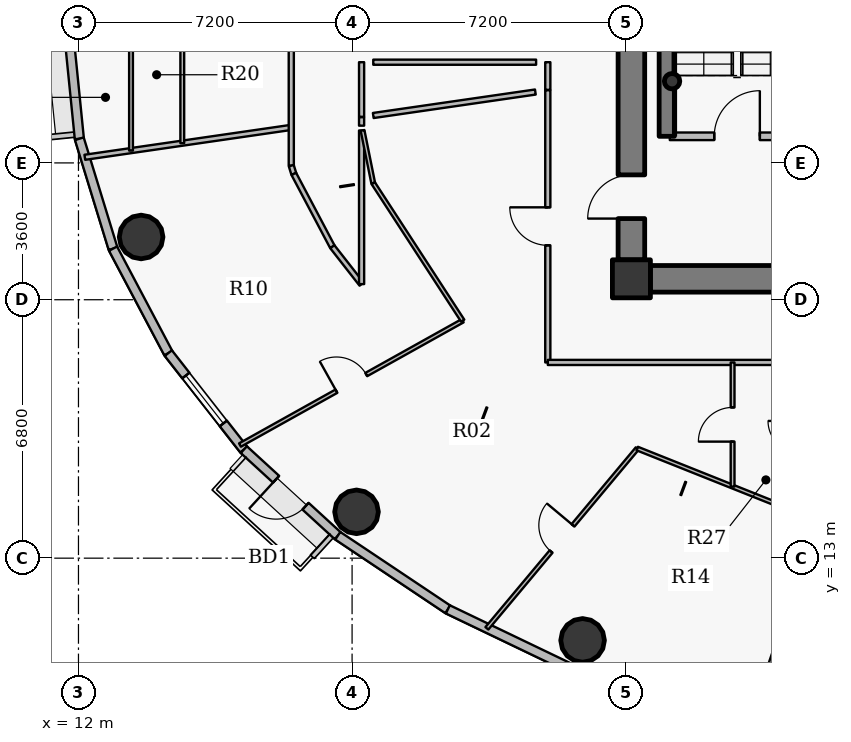
"""IFC4 building model, lengths in metres.
Left out: names, types, materials, properties, quantities, classifications, styles, units other than length and angle.
Written with IfcOpenShell. Run it as: python <this file> out.ifc"""

import sys

from ifc_helpers import new_model, si_unit, direction, frame, frame_2d, origin, origin_2d, place, context, subcontext, project, spatial, rectangle, hollow_circle, extrude, source, transform, mapped, element, fill, save


model = new_model("IFC4")
c1 = context("Model", 3, precision=1e-05, world=origin(), true_north=direction((0.0, 1.0)))
c2 = subcontext(c1, "Body", "Model", "MODEL_VIEW")
j1 = project(units=[si_unit("LENGTHUNIT", "METRE"), si_unit("PLANEANGLEUNIT", "RADIAN")], contexts=[c1])
p1 = place(None, origin())
s1 = spatial("IfcSite", under=j1, at=p1, CompositionType="ELEMENT")
p2 = place(p1, origin())
s2 = spatial("IfcBuilding", under=s1, at=p2, CompositionType="ELEMENT")
p3 = place(p2, frame((0.0, 0.0, 232.8)))
s3 = spatial("IfcBuildingStorey", under=s2, at=p3, CompositionType="ELEMENT", Elevation=232.8)
p4 = place(p3, frame((26.55, 20.35, 0.0), z_axis=(0.0, 0.0, 1.0), x_axis=(1.0, 0.0, 0.0)))
e1 = element("IfcColumn", 1, at=p4, inside=s3, PredefinedType="COLUMN", context=c2, shape_type="SweptSolid", body=[
    extrude(rectangle(XDim=1.0, YDim=1.0, at=origin_2d()), origin(), (0.0, 0.0, 1.0), 3.75),
])
p5 = place(p3, frame((27.48, 24.1, 0.0), z_axis=(0.0, 0.0, 1.0), x_axis=(0.0, 1.0, 0.0)))
e2 = element("IfcWall", 2, at=p5, inside=s3, PredefinedType="SHEAR", context=c2, shape_type="SweptSolid", body=[
    extrude(rectangle(XDim=8.6, YDim=0.4, at=frame_2d((4.3, 0.0))), origin(), (0.0, 0.0, 1.0), 3.75),
])
p6 = place(p3, frame((27.62, 25.55, 0.0), z_axis=(0.0, 0.0, 1.0), x_axis=(1.0, 0.0, 0.0)))
e3 = element("IfcColumn", 3, at=p6, inside=s3, PredefinedType="COLUMN", context=c2, shape_type="SweptSolid", body=[
    extrude(hollow_circle(Radius=0.203, WallThickness=0.016, at=origin_2d()), origin(), (0.0, 0.0, 1.0), 3.75),
])
p7 = place(p3, frame((44.95, 20.35, 0.0), z_axis=(0.0, 0.0, 1.0), x_axis=(-1.0, 0.0, 0.0)))
e4 = element("IfcWall", 4, at=p7, inside=s3, PredefinedType="SHEAR", context=c2, shape_type="SweptSolid", body=[
    extrude(rectangle(XDim=17.9, YDim=0.7, at=frame_2d((8.95, 0.0))), origin(), (0.0, 0.0, 1.0), 3.05),
])
p8 = place(p7, frame((9.7, 0.0, 0.0)))
e5 = element("IfcOpeningElement", 5, at=p8, cuts=e4, PredefinedType="OPENING", context=c2, shape_type="SweptSolid", body=[
    extrude(rectangle(XDim=1.15, YDim=2.15, at=origin_2d()), frame((0.575, 0.36, 1.075), z_axis=(0.0, -1.0, 0.0), x_axis=(1.0, 0.0, 0.0)), (0.0, 0.0, 1.0), 0.72),
])
p9 = place(p3, frame((26.55, 20.85, 0.0), z_axis=(0.0, 0.0, 1.0), x_axis=(0.0, 1.0, 0.0)))
e6 = element("IfcWall", 6, at=p9, inside=s3, PredefinedType="SHEAR", context=c2, shape_type="SweptSolid", body=[
    extrude(rectangle(XDim=12.3, YDim=0.7, at=frame_2d((6.15, 0.0))), origin(), (0.0, 0.0, 1.0), 3.05),
])
p10 = place(p9, frame((1.085, 0.0, 0.0)))
e7 = element("IfcOpeningElement", 7, at=p10, cuts=e6, PredefinedType="OPENING", context=c2, shape_type="SweptSolid", body=[
    extrude(rectangle(XDim=1.15, YDim=2.15, at=origin_2d()), frame((0.575, 0.36, 1.075), z_axis=(0.0, -1.0, 0.0), x_axis=(1.0, 0.0, 0.0)), (0.0, 0.0, 1.0), 0.72),
])
for number, where, z_axis, x_axis in (
    (8, (13.649, 21.451, 0.0), (0.0, 0.0, 1.0), (1.0, 0.0, 0.0)),
    (9, (19.317, 14.219, 0.0), (0.0, 0.0, 1.0), (1.0, 0.0, 0.0)),
    (10, (25.265, 10.836, 0.0), (0.0, 0.0, 1.0), (1.0, 0.0, 0.0)),
):
    element("IfcColumn", number, at=place(p3, frame(where, z_axis=z_axis, x_axis=x_axis)), inside=s3, PredefinedType="COLUMN", context=c2, shape_type="SweptSolid", body=[
        extrude(hollow_circle(Radius=0.575, WallThickness=0.036, at=origin_2d()), origin(), (0.0, 0.0, 1.0), 3.75),
    ])
p11 = place(p3, frame((12.023, 24.036, 0.0), z_axis=(0.0, 0.0, 1.0), x_axis=(-0.099990595253, 0.994988382274, 0.0)))
e11 = element("IfcWall", 11, at=p11, inside=s3, PredefinedType="SOLIDWALL", context=c2, shape_type="SweptSolid", body=[
    extrude(rectangle(XDim=2.979, YDim=0.24, at=frame_2d((1.489, 0.0))), origin(), (0.0, 0.0, 1.0), 3.5),
])
p12 = place(p3, frame((12.91, 21.144, 0.0), z_axis=(0.0, 0.0, 1.0), x_axis=(-0.293132907334, 0.95607170162, 0.0)))
e12 = element("IfcWall", 12, at=p12, inside=s3, PredefinedType="SOLIDWALL", context=c2, shape_type="SweptSolid", body=[
    extrude(rectangle(XDim=3.025, YDim=0.24, at=frame_2d((1.512, 0.0))), origin(), (0.0, 0.0, 1.0), 3.5),
])
p13 = place(p3, frame((14.364, 18.395, 0.0), z_axis=(0.0, 0.0, 1.0), x_axis=(-0.46766049993, 0.883908172157, 0.0)))
e13 = element("IfcWall", 13, at=p13, inside=s3, PredefinedType="SOLIDWALL", context=c2, shape_type="SweptSolid", body=[
    extrude(rectangle(XDim=3.11, YDim=0.24, at=frame_2d((1.555, 0.0))), origin(), (0.0, 0.0, 1.0), 3.5),
])
p14 = place(p3, frame((16.352, 15.855, 0.0), z_axis=(0.0, 0.0, 1.0), x_axis=(-0.616312344705, 0.787501805562, 0.0)))
e14 = element("IfcWall", 14, at=p14, inside=s3, PredefinedType="SOLIDWALL", context=c2, shape_type="SweptSolid", body=[
    extrude(rectangle(XDim=3.225, YDim=0.24, at=frame_2d((1.612, 0.0))), origin(), (0.0, 0.0, 1.0), 3.5),
])
p15 = place(p14, frame((0.876, 0.0, 0.9)))
e15 = element("IfcOpeningElement", 15, at=p15, cuts=e14, PredefinedType="OPENING", context=c2, shape_type="SweptSolid", body=[
    extrude(rectangle(XDim=1.6, YDim=1.75, at=origin_2d()), frame((0.8, 0.13, 0.875), z_axis=(0.0, -1.0, 0.0), x_axis=(1.0, 0.0, 0.0)), (0.0, 0.0, 1.0), 0.26),
])
p16 = place(p3, frame((18.824, 13.589, 0.0), z_axis=(0.0, 0.0, 1.0), x_axis=(-0.737123922599, 0.675757591694, 0.0)))
e16 = element("IfcWall", 16, at=p16, inside=s3, PredefinedType="SOLIDWALL", context=c2, shape_type="SweptSolid", body=[
    extrude(rectangle(XDim=3.354, YDim=0.24, at=frame_2d((1.677, 0.0))), origin(), (0.0, 0.0, 1.0), 3.5),
])
p17 = place(p16, frame((1.152, 0.0, 0.0)))
e17 = element("IfcOpeningElement", 17, at=p17, cuts=e16, PredefinedType="OPENING", context=c2, shape_type="SweptSolid", body=[
    extrude(rectangle(XDim=1.05, YDim=2.15, at=origin_2d()), frame((0.525, 0.13, 1.075), z_axis=(0.0, -1.0, 0.0), x_axis=(1.0, 0.0, 0.0)), (0.0, 0.0, 1.0), 0.26),
])
p18 = place(p3, frame((21.72, 11.652, 0.0), z_axis=(0.0, 0.0, 1.0), x_axis=(-0.831262496074, 0.555880079352, 0.0)))
e18 = element("IfcWall", 18, at=p18, inside=s3, PredefinedType="SOLIDWALL", context=c2, shape_type="SweptSolid", body=[
    extrude(rectangle(XDim=3.484, YDim=0.24, at=frame_2d((1.742, 0.0))), origin(), (0.0, 0.0, 1.0), 3.5),
])
p19 = place(p3, frame((24.969, 10.094, 0.0), z_axis=(0.0, 0.0, 1.0), x_axis=(-0.901598104751, 0.432574684313, 0.0)))
e19 = element("IfcWall", 19, at=p19, inside=s3, PredefinedType="SOLIDWALL", context=c2, shape_type="SweptSolid", body=[
    extrude(rectangle(XDim=3.604, YDim=0.24, at=frame_2d((1.802, 0.0))), origin(), (0.0, 0.0, 1.0), 3.5),
])
p20 = place(p3, frame((12.167, 23.548, 0.0), z_axis=(0.0, 0.0, 1.0), x_axis=(0.989672764262, 0.143345106921, 0.0)))
e20 = element("IfcWall", 20, at=p20, inside=s3, PredefinedType="PARTITIONING", context=c2, shape_type="SweptSolid", body=[
    extrude(rectangle(XDim=5.489, YDim=0.135, at=frame_2d((2.745, 0.0))), origin(), (0.0, 0.0, 1.0), 2.985),
])
p21 = place(p3, frame((13.383, 23.724, 0.0), z_axis=(0.0, 0.0, 1.0), x_axis=(0.0, 1.0, 0.0)))
e21 = element("IfcWall", 21, at=p21, inside=s3, PredefinedType="PARTITIONING", context=c2, shape_type="SweptSolid", body=[
    extrude(rectangle(XDim=10.037, YDim=0.1, at=frame_2d((5.019, 0.0))), origin(), (0.0, 0.0, 1.0), 2.935),
])
p22 = place(p21, frame((4.608, 0.0, 0.0)))
e22 = element("IfcOpeningElement", 22, at=p22, cuts=e21, PredefinedType="OPENING", context=c2, shape_type="SweptSolid", body=[
    extrude(rectangle(XDim=0.82, YDim=2.1, at=origin_2d()), frame((0.41, 0.06, 1.05), z_axis=(0.0, -1.0, 0.0), x_axis=(1.0, 0.0, 0.0)), (0.0, 0.0, 1.0), 0.12),
])
p23 = place(p3, frame((14.732, 23.919, 0.0), z_axis=(0.0, 0.0, 1.0), x_axis=(0.0, 1.0, 0.0)))
e23 = element("IfcWall", 23, at=p23, inside=s3, PredefinedType="PARTITIONING", context=c2, shape_type="SweptSolid", body=[
    extrude(rectangle(XDim=8.708, YDim=0.1, at=frame_2d((4.354, 0.0))), origin(), (0.0, 0.0, 1.0), 2.935),
])
p24 = place(p23, frame((3.904, 0.0, 0.0)))
e24 = element("IfcOpeningElement", 24, at=p24, cuts=e23, PredefinedType="OPENING", context=c2, shape_type="SweptSolid", body=[
    extrude(rectangle(XDim=0.9, YDim=2.1, at=origin_2d()), frame((0.45, 0.06, 1.05), z_axis=(0.0, -1.0, 0.0), x_axis=(1.0, 0.0, 0.0)), (0.0, 0.0, 1.0), 0.12),
])
p25 = place(p3, frame((16.25, 15.977, 0.0), z_axis=(0.0, 0.0, 1.0), x_axis=(0.87319302211, 0.487374543999, 0.0)))
e25 = element("IfcWall", 25, at=p25, inside=s3, PredefinedType="PARTITIONING", context=c2, shape_type="SweptSolid", body=[
    extrude(rectangle(XDim=6.712, YDim=0.1, at=frame_2d((3.356, 0.0))), origin(), (0.0, 0.0, 1.0), 2.985),
])
p26 = place(p25, frame((2.906, 0.0, 0.0)))
e26 = element("IfcOpeningElement", 26, at=p26, cuts=e25, PredefinedType="OPENING", context=c2, shape_type="SweptSolid", body=[
    extrude(rectangle(XDim=0.9, YDim=2.1, at=origin_2d()), frame((0.45, 0.06, 1.05), z_axis=(0.0, -1.0, 0.0), x_axis=(1.0, 0.0, 0.0)), (0.0, 0.0, 1.0), 0.12),
])
p27 = place(p3, frame((17.6, 23.328, 0.0), z_axis=(0.0, 0.0, 1.0), x_axis=(0.0, 1.0, 0.0)))
e27 = element("IfcWall", 27, at=p27, inside=s3, PredefinedType="PARTITIONING", context=c2, shape_type="SweptSolid", body=[
    extrude(rectangle(XDim=4.622, YDim=0.135, at=frame_2d((2.311, 0.0))), origin(), (0.0, 0.0, 1.0), 2.935),
])
p28 = place(p3, frame((17.6, 23.328, 0.0), z_axis=(0.0, 0.0, 1.0), x_axis=(0.292875000845, -0.956150738053, 0.0)))
e28 = element("IfcWall", 28, at=p28, inside=s3, PredefinedType="PARTITIONING", context=c2, shape_type="SweptSolid", body=[
    extrude(rectangle(XDim=0.227, YDim=0.135, at=frame_2d((0.113, 0.0))), origin(), (0.0, 0.0, 1.0), 3.5),
])
p29 = place(p3, frame((17.667, 23.111, 0.0), z_axis=(0.0, 0.0, 1.0), x_axis=(0.467675622269, -0.883900171024, 0.0)))
e29 = element("IfcWall", 29, at=p29, inside=s3, PredefinedType="PARTITIONING", context=c2, shape_type="SweptSolid", body=[
    extrude(rectangle(XDim=2.168, YDim=0.135, at=frame_2d((1.084, 0.0))), origin(), (0.0, 0.0, 1.0), 2.935),
])
p30 = place(p3, frame((18.681, 21.194, 0.0), z_axis=(0.0, 0.0, 1.0), x_axis=(0.616239706802, -0.787558647823, 0.0)))
e30 = element("IfcWall", 30, at=p30, inside=s3, PredefinedType="PARTITIONING", context=c2, shape_type="SweptSolid", body=[
    extrude(rectangle(XDim=1.248, YDim=0.135, at=frame_2d((0.624, 0.0))), origin(), (0.0, 0.0, 1.0), 3.5),
])
p31 = place(p3, frame((19.45, 20.211, 0.0), z_axis=(0.0, 0.0, 1.0), x_axis=(0.0, 1.0, 0.0)))
e31 = element("IfcWall", 31, at=p31, inside=s3, PredefinedType="PARTITIONING", context=c2, shape_type="SweptSolid", body=[
    extrude(rectangle(XDim=4.042, YDim=0.135, at=frame_2d((2.021, 0.0))), origin(), (0.0, 0.0, 1.0), 2.935),
])
p32 = place(p3, frame((19.45, 24.38, 0.0), z_axis=(0.0, 0.0, 1.0), x_axis=(0.0, 1.0, 0.0)))
e32 = element("IfcWall", 32, at=p32, inside=s3, PredefinedType="PARTITIONING", context=c2, shape_type="SweptSolid", body=[
    extrude(rectangle(XDim=0.223, YDim=0.135, at=frame_2d((0.111, 0.0))), origin(), (0.0, 0.0, 1.0), 3.5),
])
p33 = place(p3, frame((19.475, 24.256, 0.0), z_axis=(0.0, 0.0, 1.0), x_axis=(0.198203790622, -0.980160832406, 0.0)))
e33 = element("IfcWall", 33, at=p33, inside=s3, PredefinedType="PARTITIONING", context=c2, shape_type="SweptSolid", body=[
    extrude(rectangle(XDim=1.417, YDim=0.1, at=frame_2d((0.708, 0.0))), origin(), (0.0, 0.0, 1.0), 2.935),
])
p34 = place(p3, frame((19.756, 22.867, 0.0), z_axis=(0.0, 0.0, 1.0), x_axis=(0.545441385955, -0.83814896915, 0.0)))
e34 = element("IfcWall", 34, at=p34, inside=s3, PredefinedType="PARTITIONING", context=c2, shape_type="SweptSolid", body=[
    extrude(rectangle(XDim=4.318, YDim=0.1, at=frame_2d((2.159, 0.0))), origin(), (0.0, 0.0, 1.0), 2.935),
])
p35 = place(p3, frame((22.747, 11.154, 0.0), z_axis=(0.0, 0.0, 1.0), x_axis=(0.641565789242, 0.767068013982, 0.0)))
e35 = element("IfcWall", 35, at=p35, inside=s3, PredefinedType="PARTITIONING", context=c2, shape_type="SweptSolid", body=[
    extrude(rectangle(XDim=6.167, YDim=0.1, at=frame_2d((3.083, 0.0))), origin(), (0.0, 0.0, 1.0), 2.985),
])
p36 = place(p35, frame((2.633, 0.0, 0.0)))
e36 = element("IfcOpeningElement", 36, at=p36, cuts=e35, PredefinedType="OPENING", context=c2, shape_type="SweptSolid", body=[
    extrude(rectangle(XDim=0.9, YDim=2.1, at=origin_2d()), frame((0.45, 0.06, 1.05), z_axis=(0.0, -1.0, 0.0), x_axis=(1.0, 0.0, 0.0)), (0.0, 0.0, 1.0), 0.12),
])
p37 = place(p3, frame((24.35, 18.15, 0.0), z_axis=(0.0, 0.0, 1.0), x_axis=(0.0, 1.0, 0.0)))
e37 = element("IfcWall", 37, at=p37, inside=s3, PredefinedType="PARTITIONING", context=c2, shape_type="SweptSolid", body=[
    extrude(rectangle(XDim=7.163, YDim=0.135, at=frame_2d((3.581, 0.0))), origin(), (0.0, 0.0, 1.0), 2.935),
])
p38 = place(p37, frame((3.081, 0.0, 0.0)))
e38 = element("IfcOpeningElement", 38, at=p38, cuts=e37, PredefinedType="OPENING", context=c2, shape_type="SweptSolid", body=[
    extrude(rectangle(XDim=1.0, YDim=2.15, at=origin_2d()), frame((0.5, 0.078, 1.075), z_axis=(0.0, -1.0, 0.0), x_axis=(1.0, 0.0, 0.0)), (0.0, 0.0, 1.0), 0.155),
])
p39 = place(p3, frame((24.35, 18.15, 0.0), z_axis=(0.0, 0.0, 1.0), x_axis=(1.0, 0.0, 0.0)))
e39 = element("IfcWall", 39, at=p39, inside=s3, PredefinedType="PARTITIONING", context=c2, shape_type="SweptSolid", body=[
    extrude(rectangle(XDim=23.85, YDim=0.135, at=frame_2d((11.925, 0.0))), origin(), (0.0, 0.0, 1.0), 2.935),
])
p40 = place(p39, frame((14.838, 0.0, 0.0)))
e40 = element("IfcOpeningElement", 40, at=p40, cuts=e39, PredefinedType="OPENING", context=c2, shape_type="SweptSolid", body=[
    extrude(rectangle(XDim=1.0, YDim=2.15, at=origin_2d()), frame((0.5, 0.078, 1.075), z_axis=(0.0, -1.0, 0.0), x_axis=(1.0, 0.0, 0.0)), (0.0, 0.0, 1.0), 0.155),
])
p41 = place(p39, frame((21.472, 0.0, 0.0)))
e41 = element("IfcOpeningElement", 41, at=p41, cuts=e39, PredefinedType="OPENING", context=c2, shape_type="SweptSolid", body=[
    extrude(rectangle(XDim=1.0, YDim=2.15, at=origin_2d()), frame((0.5, 0.078, 1.075), z_axis=(0.0, -1.0, 0.0), x_axis=(1.0, 0.0, 0.0)), (0.0, 0.0, 1.0), 0.155),
])
p42 = place(p3, frame((26.703, 15.884, 0.0), z_axis=(0.0, 0.0, 1.0), x_axis=(0.928807108231, -0.370563564991, 0.0)))
e42 = element("IfcWall", 42, at=p42, inside=s3, PredefinedType="PARTITIONING", context=c2, shape_type="SweptSolid", body=[
    extrude(rectangle(XDim=4.327, YDim=0.1, at=frame_2d((2.163, 0.0))), origin(), (0.0, 0.0, 1.0), 2.935),
])
p43 = place(p3, frame((27.56, 24.1, 0.0), z_axis=(0.0, 0.0, 1.0), x_axis=(1.0, 0.0, 0.0)))
e43 = element("IfcWall", 43, at=p43, inside=s3, PredefinedType="PARTITIONING", context=c2, shape_type="SweptSolid", body=[
    extrude(rectangle(XDim=3.54, YDim=0.2, at=frame_2d((1.77, 0.0))), origin(), (0.0, 0.0, 1.0), 3.5),
])
p44 = place(p43, frame((1.17, 0.0, 0.0)))
e44 = element("IfcOpeningElement", 44, at=p44, cuts=e43, PredefinedType="OPENING", context=c2, shape_type="SweptSolid", body=[
    extrude(rectangle(XDim=1.2, YDim=2.15, at=origin_2d()), frame((0.6, 0.11, 1.075), z_axis=(0.0, -1.0, 0.0), x_axis=(1.0, 0.0, 0.0)), (0.0, 0.0, 1.0), 0.22),
])
p45 = place(p3, frame((29.213, 14.883, 0.0), z_axis=(0.0, 0.0, 1.0), x_axis=(0.0, 1.0, 0.0)))
e45 = element("IfcWall", 45, at=p45, inside=s3, PredefinedType="PARTITIONING", context=c2, shape_type="SweptSolid", body=[
    extrude(rectangle(XDim=3.267, YDim=0.1, at=frame_2d((1.633, 0.0))), origin(), (0.0, 0.0, 1.0), 2.935),
])
p46 = place(p45, frame((1.183, 0.0, 0.0)))
e46 = element("IfcOpeningElement", 46, at=p46, cuts=e45, PredefinedType="OPENING", context=c2, shape_type="SweptSolid", body=[
    extrude(rectangle(XDim=0.9, YDim=2.1, at=origin_2d()), frame((0.45, 0.06, 1.05), z_axis=(0.0, -1.0, 0.0), x_axis=(1.0, 0.0, 0.0)), (0.0, 0.0, 1.0), 0.12),
])
p47 = place(p3, frame((29.711, 8.717, 0.0), z_axis=(0.0, 0.0, 1.0), x_axis=(0.325280852175, 0.945617452889, 0.0)))
e47 = element("IfcWall", 47, at=p47, inside=s3, PredefinedType="PARTITIONING", context=c2, shape_type="SweptSolid", body=[
    extrude(rectangle(XDim=9.976, YDim=0.135, at=frame_2d((4.988, 0.0))), origin(), (0.0, 0.0, 1.0), 2.985),
])
p48 = place(p3, frame((19.45, 26.05, 0.0), z_axis=(0.0, 0.0, 1.0), x_axis=(0.0, -1.0, 0.0)))
e48 = element("IfcWall", 48, at=p48, inside=s3, PredefinedType="PARTITIONING", context=c2, shape_type="SweptSolid", body=[
    extrude(rectangle(XDim=1.437, YDim=0.135, at=frame_2d((0.719, 0.0))), origin(), (0.0, 0.0, 1.0), 3.5),
])
p49 = place(p3, frame((26.2, 20.84, 0.0), z_axis=(0.0, 0.0, 1.0), x_axis=(0.0, -1.0, 0.0)))
e49 = element("IfcWall", 49, at=p49, inside=s3, PredefinedType="PARTITIONING", context=c2, shape_type="SweptSolid", body=[
    extrude(rectangle(XDim=0.84, YDim=0.135, at=frame_2d((0.42, 0.0))), origin(), (0.0, 0.0, 1.0), 3.5),
])
p50 = place(p3, frame((26.508, 20.0, 0.0), z_axis=(0.0, 0.0, 1.0), x_axis=(1.0, 0.0, 0.0)))
e50 = element("IfcWall", 50, at=p50, inside=s3, PredefinedType="PARTITIONING", context=c2, shape_type="SweptSolid", body=[
    extrude(rectangle(XDim=0.532, YDim=0.135, at=frame_2d((0.266, 0.0))), origin(), (0.0, 0.0, 1.0), 2.935),
])
p51 = place(p3, frame((24.35, 25.323, 0.0), z_axis=(0.0, 0.0, 1.0), x_axis=(0.0, 1.0, 0.0)))
e51 = element("IfcWall", 51, at=p51, inside=s3, PredefinedType="PARTITIONING", context=c2, shape_type="SweptSolid", body=[
    extrude(rectangle(XDim=0.728, YDim=0.135, at=frame_2d((0.364, 0.0))), origin(), (0.0, 0.0, 1.0), 3.5),
])
p52 = place(p3, frame((24.042, 26.05, 0.0), z_axis=(0.0, 0.0, 1.0), x_axis=(-1.0, 0.0, 0.0)))
e52 = element("IfcWall", 52, at=p52, inside=s3, PredefinedType="PARTITIONING", context=c2, shape_type="SweptSolid", body=[
    extrude(rectangle(XDim=4.285, YDim=0.135, at=frame_2d((2.143, 0.0))), origin(), (0.0, 0.0, 1.0), 3.5),
])
p53 = place(p3, frame((19.758, 24.647, 0.0), z_axis=(0.0, 0.0, 1.0), x_axis=(0.989666541967, 0.143388059861, 0.0)))
e53 = element("IfcWall", 53, at=p53, inside=s3, PredefinedType="PARTITIONING", context=c2, shape_type="SweptSolid", body=[
    extrude(rectangle(XDim=4.309, YDim=0.135, at=frame_2d((2.155, 0.0))), origin(), (0.0, 0.0, 1.0), 3.5),
])
m1 = source(origin(), c2, "Body", "SweptSolid", [
    extrude(rectangle(XDim=1.6, YDim=1.75, at=origin_2d()), frame((0.8, 0.03, 0.875), z_axis=(0.0, -1.0, 0.0), x_axis=(1.0, 0.0, 0.0)), (0.0, 0.0, 1.0), 0.06),
])
p54 = place(p15, origin())
e54 = element("IfcWindow", 54, at=p54, inside=s3, PartitioningType="DOUBLE_PANEL_VERTICAL", PredefinedType="WINDOW", context=c2, shape_type="MappedRepresentation", body=[
    mapped(m1, transform((0.0, 0.0, 0.0), x_axis=(1.0, 0.0, 0.0), y_axis=(0.0, 1.0, 0.0), z_axis=(0.0, 0.0, 1.0), scale=1.0)),
])
fill(e15, e54)
m2 = source(origin(), c2, "Body", "SweptSolid", [
    extrude(rectangle(XDim=1.05, YDim=2.15, at=origin_2d()), frame((0.525, 0.025, 1.075), z_axis=(0.0, -1.0, 0.0), x_axis=(1.0, 0.0, 0.0)), (0.0, 0.0, 1.0), 0.05),
])
p55 = place(p17, origin())
e55 = element("IfcDoor", 55, at=p55, inside=s3, OperationType="SINGLE_SWING_RIGHT", PredefinedType="DOOR", context=c2, shape_type="MappedRepresentation", body=[
    mapped(m2, transform((0.0, 0.0, 0.0), x_axis=(1.0, 0.0, 0.0), y_axis=(0.0, 1.0, 0.0), z_axis=(0.0, 0.0, 1.0), scale=1.0)),
])
fill(e17, e55)
m3 = source(origin(), c2, "Body", "SweptSolid", [
    extrude(rectangle(XDim=1.15, YDim=2.15, at=origin_2d()), frame((0.575, 0.025, 1.075), z_axis=(0.0, -1.0, 0.0), x_axis=(1.0, 0.0, 0.0)), (0.0, 0.0, 1.0), 0.05),
])
p56 = place(p10, origin())
e56 = element("IfcDoor", 56, at=p56, inside=s3, OperationType="SINGLE_SWING_LEFT", PredefinedType="DOOR", context=c2, shape_type="MappedRepresentation", body=[
    mapped(m3, transform((0.0, 0.0, 0.0), x_axis=(1.0, 0.0, 0.0), y_axis=(0.0, 1.0, 0.0), z_axis=(0.0, 0.0, 1.0), scale=1.0)),
])
fill(e7, e56)
m4 = source(origin(), c2, "Body", "SweptSolid", [
    extrude(rectangle(XDim=1.2, YDim=2.15, at=origin_2d()), frame((0.6, 0.025, 1.075), z_axis=(0.0, -1.0, 0.0), x_axis=(1.0, 0.0, 0.0)), (0.0, 0.0, 1.0), 0.05),
])
p57 = place(p44, origin())
e57 = element("IfcDoor", 57, at=p57, inside=s3, OperationType="SINGLE_SWING_RIGHT", PredefinedType="DOOR", context=c2, shape_type="MappedRepresentation", body=[
    mapped(m4, transform((0.0, 0.0, 0.0), x_axis=(1.0, 0.0, 0.0), y_axis=(0.0, 1.0, 0.0), z_axis=(0.0, 0.0, 1.0), scale=1.0)),
])
fill(e44, e57)
m5 = source(origin(), c2, "Body", "SweptSolid", [
    extrude(rectangle(XDim=1.0, YDim=2.15, at=origin_2d()), frame((0.5, 0.025, 1.075), z_axis=(0.0, -1.0, 0.0), x_axis=(1.0, 0.0, 0.0)), (0.0, 0.0, 1.0), 0.05),
])
p58 = place(p38, origin())
e58 = element("IfcDoor", 58, at=p58, inside=s3, OperationType="SINGLE_SWING_RIGHT", PredefinedType="DOOR", context=c2, shape_type="MappedRepresentation", body=[
    mapped(m5, transform((0.0, 0.0, 0.0), x_axis=(1.0, 0.0, 0.0), y_axis=(0.0, 1.0, 0.0), z_axis=(0.0, 0.0, 1.0), scale=1.0)),
])
fill(e38, e58)
m6 = source(origin(), c2, "Body", "SweptSolid", [
    extrude(rectangle(XDim=0.9, YDim=2.1, at=origin_2d()), frame((0.45, 0.025, 1.05), z_axis=(0.0, -1.0, 0.0), x_axis=(1.0, 0.0, 0.0)), (0.0, 0.0, 1.0), 0.05),
])
p59 = place(p26, origin())
e59 = element("IfcDoor", 59, at=p59, inside=s3, OperationType="SINGLE_SWING_LEFT", PredefinedType="DOOR", context=c2, shape_type="MappedRepresentation", body=[
    mapped(m6, transform((0.0, 0.0, 0.0), x_axis=(1.0, 0.0, 0.0), y_axis=(0.0, 1.0, 0.0), z_axis=(0.0, 0.0, 1.0), scale=1.0)),
])
fill(e26, e59)
p60 = place(p36, origin())
e60 = element("IfcDoor", 60, at=p60, inside=s3, OperationType="SINGLE_SWING_RIGHT", PredefinedType="DOOR", context=c2, shape_type="MappedRepresentation", body=[
    mapped(m6, transform((0.0, 0.0, 0.0), x_axis=(1.0, 0.0, 0.0), y_axis=(0.0, 1.0, 0.0), z_axis=(0.0, 0.0, 1.0), scale=1.0)),
])
fill(e36, e60)
p61 = place(p46, origin())
e61 = element("IfcDoor", 61, at=p61, inside=s3, OperationType="SINGLE_SWING_LEFT", PredefinedType="DOOR", context=c2, shape_type="MappedRepresentation", body=[
    mapped(m6, transform((0.0, 0.0, 0.0), x_axis=(1.0, 0.0, 0.0), y_axis=(0.0, 1.0, 0.0), z_axis=(0.0, 0.0, 1.0), scale=1.0)),
])
fill(e46, e61)
save(model, sys.argv[1])
